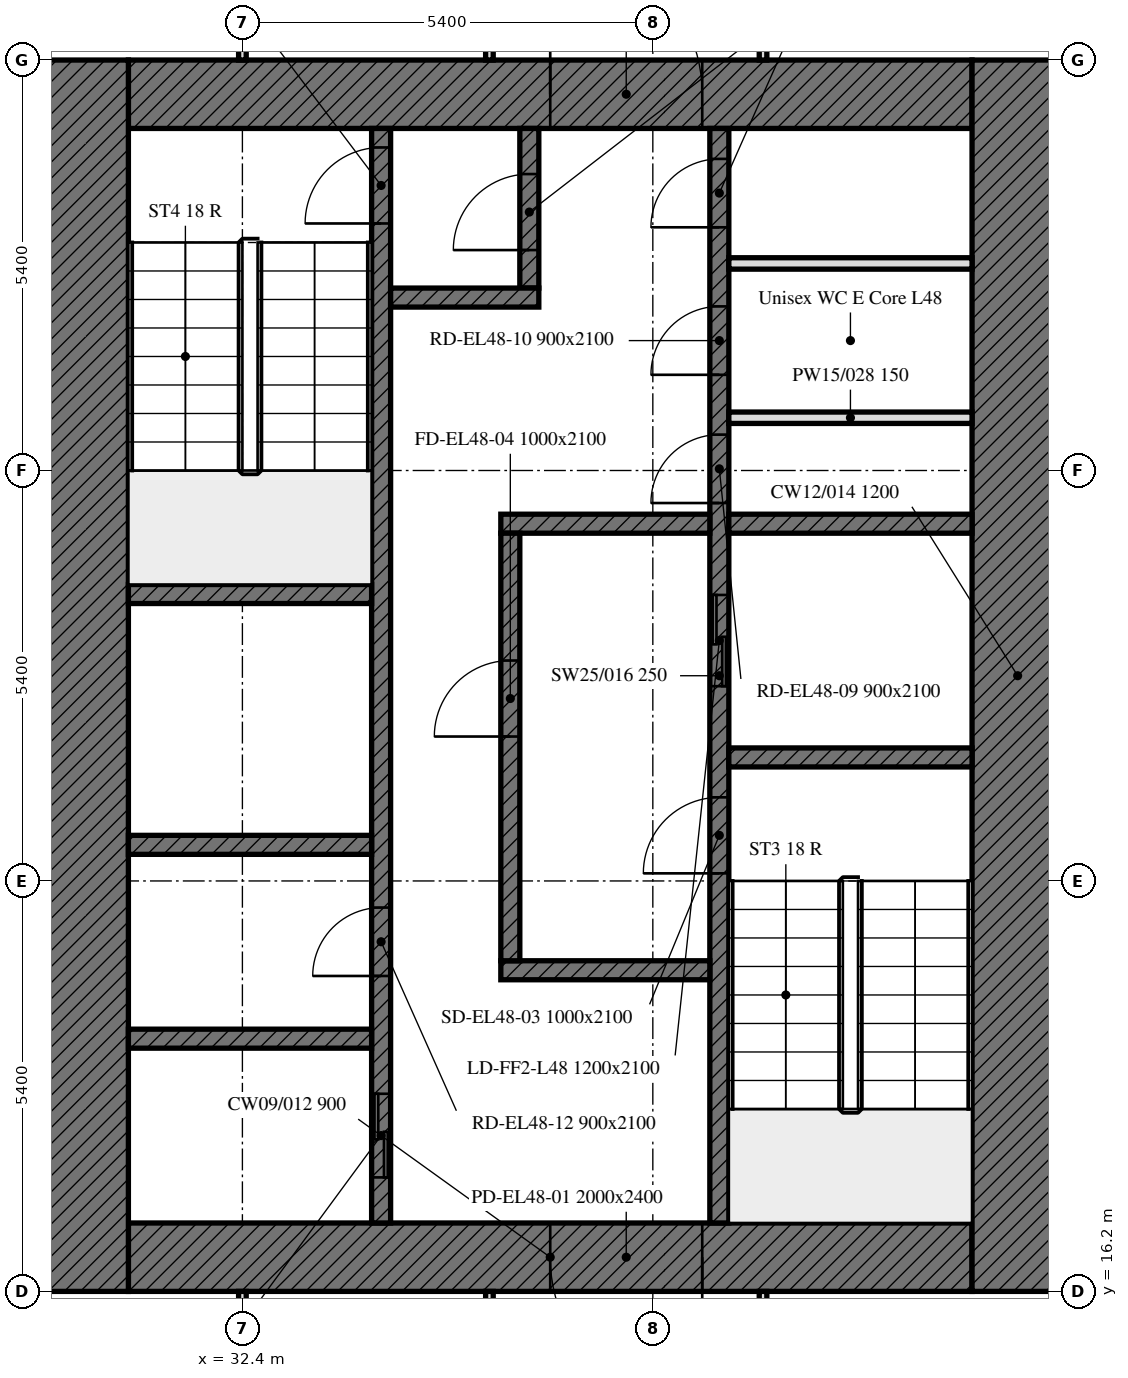
"""IFC4 building model, lengths in metres.
Left out: names, types, materials, properties, quantities, classifications, styles, units other than length and angle.
Written with IfcOpenShell. Run it as: python <this file> out.ifc"""

import sys

from ifc_helpers import new_model, si_unit, direction, frame, frame_2d, origin, place, context, subcontext, project, spatial, rectangle, extrude, element, fill, save


model = new_model("IFC4")
c1 = context("Model", 3, precision=1e-05, world=origin(), true_north=direction((0.0, 1.0)))
c2 = subcontext(c1, "Body", "Model", "MODEL_VIEW")
j1 = project(units=[si_unit("LENGTHUNIT", "METRE"), si_unit("PLANEANGLEUNIT", "RADIAN")], contexts=[c1])
p1 = place(None, origin())
s1 = spatial("IfcSite", under=j1, at=p1, CompositionType="ELEMENT")
p2 = place(p1, origin())
s2 = spatial("IfcBuilding", under=s1, at=p2, CompositionType="ELEMENT")
p3 = place(p2, frame((0.0, 0.0, 197.2)))
s3 = spatial("IfcBuildingStorey", under=s2, at=p3, CompositionType="ELEMENT", Elevation=197.2)
p4 = place(p3, frame((42.0, 16.65, 0.0), z_axis=(0.0, 0.0, 1.0), x_axis=(-1.0, 0.0, 0.0)))
e1 = element("IfcWall", 1, at=p4, inside=s3, PredefinedType="SOLIDWALL", context=c2, shape_type="SweptSolid", body=[
    extrude(rectangle(XDim=11.1, YDim=0.9, at=frame_2d((5.55, 0.0))), origin(), (0.0, 0.0, 1.0), 3.0),
])
p5 = place(p4, frame((3.55, 0.0, 0.0)))
e2 = element("IfcOpeningElement", 2, at=p5, cuts=e1, PredefinedType="OPENING", context=c2, shape_type="SweptSolid", body=[
    extrude(rectangle(XDim=2.0, YDim=2.4, at=frame_2d((1.0, 1.2))), frame((0.0, 0.45, 0.0), z_axis=(0.0, -1.0, 0.0), x_axis=(1.0, 0.0, 0.0)), (0.0, 0.0, 1.0), 0.9),
])
p6 = place(p3, frame((30.9, 31.95, 0.0), z_axis=(0.0, 0.0, 1.0), x_axis=(1.0, 0.0, 0.0)))
e3 = element("IfcWall", 3, at=p6, inside=s3, PredefinedType="SOLIDWALL", context=c2, shape_type="SweptSolid", body=[
    extrude(rectangle(XDim=11.1, YDim=0.9, at=frame_2d((5.55, 0.0))), origin(), (0.0, 0.0, 1.0), 3.0),
])
p7 = place(p6, frame((5.55, 0.0, 0.0)))
e4 = element("IfcOpeningElement", 4, at=p7, cuts=e3, PredefinedType="OPENING", context=c2, shape_type="SweptSolid", body=[
    extrude(rectangle(XDim=2.0, YDim=2.4, at=frame_2d((1.0, 1.2))), frame((0.0, 0.45, 0.0), z_axis=(0.0, -1.0, 0.0), x_axis=(1.0, 0.0, 0.0)), (0.0, 0.0, 1.0), 0.9),
])
for number, where, z_axis, x_axis in (
    (5, (42.6, 32.4, 0.0), (0.0, 0.0, 1.0), (0.0, -1.0, 0.0)),
    (6, (30.3, 16.2, 0.0), (0.0, 0.0, 1.0), (0.0, 1.0, 0.0)),
):
    element("IfcWall", number, at=place(p3, frame(where, z_axis=z_axis, x_axis=x_axis)), inside=s3, PredefinedType="SOLIDWALL", context=c2, shape_type="SweptSolid", body=[
        extrude(rectangle(XDim=16.2, YDim=1.2, at=frame_2d((8.1, 0.0))), origin(), (0.0, 0.0, 1.0), 3.0),
    ])
p8 = place(p3, frame((38.675, 17.1, 0.0), z_axis=(0.0, 0.0, 1.0), x_axis=(0.0, 1.0, 0.0)))
e7 = element("IfcWall", 7, at=p8, inside=s3, PredefinedType="SOLIDWALL", context=c2, shape_type="SweptSolid", body=[
    extrude(rectangle(XDim=14.4, YDim=0.25, at=frame_2d((7.2, 0.0))), origin(), (0.0, 0.0, 1.0), 3.0),
])
p9 = place(p8, frame((4.6, 0.0, 0.0)))
e8 = element("IfcOpeningElement", 8, at=p9, cuts=e7, PredefinedType="OPENING", context=c2, shape_type="SweptSolid", body=[
    extrude(rectangle(XDim=1.0, YDim=2.1, at=frame_2d((0.5, 1.05))), frame((0.0, 0.125, 0.0), z_axis=(0.0, -1.0, 0.0), x_axis=(1.0, 0.0, 0.0)), (0.0, 0.0, 1.0), 0.25),
])
p10 = place(p8, frame((7.062, 0.0, 0.0)))
e9 = element("IfcOpeningElement", 9, at=p10, cuts=e7, PredefinedType="OPENING", context=c2, shape_type="SweptSolid", body=[
    extrude(rectangle(XDim=1.2, YDim=2.1, at=frame_2d((0.6, 1.05))), frame((0.0, 0.125, 0.0), z_axis=(0.0, -1.0, 0.0), x_axis=(1.0, 0.0, 0.0)), (0.0, 0.0, 1.0), 0.25),
])
p11 = place(p8, frame((9.472, 0.0, 0.0)))
e10 = element("IfcOpeningElement", 10, at=p11, cuts=e7, PredefinedType="OPENING", context=c2, shape_type="SweptSolid", body=[
    extrude(rectangle(XDim=0.9, YDim=2.1, at=frame_2d((0.45, 1.05))), frame((0.0, 0.125, 0.0), z_axis=(0.0, -1.0, 0.0), x_axis=(1.0, 0.0, 0.0)), (0.0, 0.0, 1.0), 0.25),
])
p12 = place(p8, frame((11.159, 0.0, 0.0)))
e11 = element("IfcOpeningElement", 11, at=p12, cuts=e7, PredefinedType="OPENING", context=c2, shape_type="SweptSolid", body=[
    extrude(rectangle(XDim=0.9, YDim=2.1, at=frame_2d((0.45, 1.05))), frame((0.0, 0.125, 0.0), z_axis=(0.0, -1.0, 0.0), x_axis=(1.0, 0.0, 0.0)), (0.0, 0.0, 1.0), 0.25),
])
p13 = place(p8, frame((13.1, 0.0, 0.0)))
e12 = element("IfcOpeningElement", 12, at=p13, cuts=e7, PredefinedType="OPENING", context=c2, shape_type="SweptSolid", body=[
    extrude(rectangle(XDim=0.9, YDim=2.1, at=frame_2d((0.45, 1.05))), frame((0.0, 0.125, 0.0), z_axis=(0.0, -1.0, 0.0), x_axis=(1.0, 0.0, 0.0)), (0.0, 0.0, 1.0), 0.25),
])
p14 = place(p3, frame((34.225, 17.1, 0.0), z_axis=(0.0, 0.0, 1.0), x_axis=(0.0, 1.0, 0.0)))
e13 = element("IfcWall", 13, at=p14, inside=s3, PredefinedType="SOLIDWALL", context=c2, shape_type="SweptSolid", body=[
    extrude(rectangle(XDim=14.4, YDim=0.25, at=frame_2d((7.2, 0.0))), origin(), (0.0, 0.0, 1.0), 3.0),
])
p15 = place(p14, frame((13.15, 0.0, 0.0)))
e14 = element("IfcOpeningElement", 14, at=p15, cuts=e13, PredefinedType="OPENING", context=c2, shape_type="SweptSolid", body=[
    extrude(rectangle(XDim=1.0, YDim=2.1, at=frame_2d((0.5, 1.05))), frame((0.0, 0.125, 0.0), z_axis=(0.0, -1.0, 0.0), x_axis=(1.0, 0.0, 0.0)), (0.0, 0.0, 1.0), 0.25),
])
p16 = place(p14, frame((0.6, 0.0, 0.0)))
e15 = element("IfcOpeningElement", 15, at=p16, cuts=e13, PredefinedType="OPENING", context=c2, shape_type="SweptSolid", body=[
    extrude(rectangle(XDim=1.1, YDim=2.1, at=frame_2d((0.55, 1.05))), frame((0.0, 0.125, 0.0), z_axis=(0.0, -1.0, 0.0), x_axis=(1.0, 0.0, 0.0)), (0.0, 0.0, 1.0), 0.25),
])
p17 = place(p14, frame((3.25, 0.0, 0.0)))
e16 = element("IfcOpeningElement", 16, at=p17, cuts=e13, PredefinedType="OPENING", context=c2, shape_type="SweptSolid", body=[
    extrude(rectangle(XDim=0.9, YDim=2.1, at=frame_2d((0.45, 1.05))), frame((0.0, 0.125, 0.0), z_axis=(0.0, -1.0, 0.0), x_axis=(1.0, 0.0, 0.0)), (0.0, 0.0, 1.0), 0.25),
])
p18 = place(p3, frame((38.8, 23.225, 0.0), z_axis=(0.0, 0.0, 1.0), x_axis=(1.0, 0.0, 0.0)))
e17 = element("IfcWall", 17, at=p18, inside=s3, PredefinedType="SOLIDWALL", context=c2, shape_type="SweptSolid", body=[
    extrude(rectangle(XDim=3.2, YDim=0.25, at=frame_2d((1.6, 0.0))), origin(), (0.0, 0.0, 1.0), 3.0),
])
for number, where, z_axis, x_axis in (
    (18, (30.9, 25.375, 0.0), (0.0, 0.0, 1.0), (1.0, 0.0, 0.0)),
    (19, (30.9, 22.075, 0.0), (0.0, 0.0, 1.0), (1.0, 0.0, 0.0)),
):
    element("IfcWall", number, at=place(p3, frame(where, z_axis=z_axis, x_axis=x_axis)), inside=s3, PredefinedType="SOLIDWALL", context=c2, shape_type="SweptSolid", body=[
        extrude(rectangle(XDim=3.2, YDim=0.25, at=frame_2d((1.6, 0.0))), origin(), (0.0, 0.0, 1.0), 3.0),
    ])
p19 = place(p3, frame((38.8, 26.3, 0.0), z_axis=(0.0, 0.0, 1.0), x_axis=(1.0, 0.0, 0.0)))
e20 = element("IfcWall", 20, at=p19, inside=s3, PredefinedType="SOLIDWALL", context=c2, shape_type="SweptSolid", body=[
    extrude(rectangle(XDim=3.2, YDim=0.25, at=frame_2d((1.6, 0.0))), origin(), (0.0, 0.0, 1.0), 3.0),
])
for number, where, z_axis, x_axis in (
    (21, (35.8, 26.3, 0.0), (0.0, 0.0, 1.0), (1.0, 0.0, 0.0)),
    (22, (35.8, 20.425, 0.0), (0.0, 0.0, 1.0), (1.0, 0.0, 0.0)),
):
    element("IfcWall", number, at=place(p3, frame(where, z_axis=z_axis, x_axis=x_axis)), inside=s3, PredefinedType="SOLIDWALL", context=c2, shape_type="SweptSolid", body=[
        extrude(rectangle(XDim=2.75, YDim=0.25, at=frame_2d((1.375, 0.0))), origin(), (0.0, 0.0, 1.0), 3.0),
    ])
p20 = place(p3, frame((36.175, 29.4, 0.0), z_axis=(0.0, 0.0, 1.0), x_axis=(0.0, 1.0, 0.0)))
e23 = element("IfcWall", 23, at=p20, inside=s3, PredefinedType="SOLIDWALL", context=c2, shape_type="SweptSolid", body=[
    extrude(rectangle(XDim=2.1, YDim=0.25, at=frame_2d((1.05, 0.0))), origin(), (0.0, 0.0, 1.0), 3.0),
])
p21 = place(p20, frame((0.5, 0.0, 0.0)))
e24 = element("IfcOpeningElement", 24, at=p21, cuts=e23, PredefinedType="OPENING", context=c2, shape_type="SweptSolid", body=[
    extrude(rectangle(XDim=1.0, YDim=2.1, at=frame_2d((0.5, 1.05))), frame((0.0, 0.125, 0.0), z_axis=(0.0, -1.0, 0.0), x_axis=(1.0, 0.0, 0.0)), (0.0, 0.0, 1.0), 0.25),
])
p22 = place(p3, frame((34.35, 29.275, 0.0), z_axis=(0.0, 0.0, 1.0), x_axis=(1.0, 0.0, 0.0)))
e25 = element("IfcWall", 25, at=p22, inside=s3, PredefinedType="SOLIDWALL", context=c2, shape_type="SweptSolid", body=[
    extrude(rectangle(XDim=1.95, YDim=0.25, at=frame_2d((0.975, 0.0))), origin(), (0.0, 0.0, 1.0), 3.0),
])
p23 = place(p3, frame((35.925, 20.55, 0.0), z_axis=(0.0, 0.0, 1.0), x_axis=(0.0, 1.0, 0.0)))
e26 = element("IfcWall", 26, at=p23, inside=s3, PredefinedType="SOLIDWALL", context=c2, shape_type="SweptSolid", body=[
    extrude(rectangle(XDim=5.625, YDim=0.25, at=frame_2d((2.812, 0.0))), origin(), (0.0, 0.0, 1.0), 3.0),
])
p24 = place(p23, frame((2.95, 0.0, 0.0)))
e27 = element("IfcOpeningElement", 27, at=p24, cuts=e26, PredefinedType="OPENING", context=c2, shape_type="SweptSolid", body=[
    extrude(rectangle(XDim=1.0, YDim=2.1, at=frame_2d((0.5, 1.05))), frame((0.0, 0.125, 0.0), z_axis=(0.0, -1.0, 0.0), x_axis=(1.0, 0.0, 0.0)), (0.0, 0.0, 1.0), 0.25),
])
p25 = place(p3, frame((30.9, 19.525, 0.0), z_axis=(0.0, 0.0, 1.0), x_axis=(1.0, 0.0, 0.0)))
e28 = element("IfcWall", 28, at=p25, inside=s3, PredefinedType="SOLIDWALL", context=c2, shape_type="SweptSolid", body=[
    extrude(rectangle(XDim=3.2, YDim=0.25, at=frame_2d((1.6, 0.0))), origin(), (0.0, 0.0, 1.0), 3.0),
])
for number, where, z_axis, x_axis in (
    (29, (38.8, 27.694, 0.0), (0.0, 0.0, 1.0), (1.0, 0.0, 0.0)),
    (30, (38.8, 29.724, 0.0), (0.0, 0.0, 1.0), (1.0, 0.0, 0.0)),
):
    element("IfcWall", number, at=place(p3, frame(where, z_axis=z_axis, x_axis=x_axis)), inside=s3, PredefinedType="PARTITIONING", context=c2, shape_type="SweptSolid", body=[
        extrude(rectangle(XDim=3.2, YDim=0.15, at=frame_2d((1.6, 0.0))), origin(), (0.0, 0.0, 1.0), 3.0),
    ])
p26 = place(p3, frame((32.4, 32.4, 0.0), z_axis=(0.0, 0.0, 1.0), x_axis=(0.0, 1.0, 0.0)))
e31 = element("IfcWall", 31, at=p26, inside=s3, PredefinedType="PARTITIONING", context=c2, shape_type="SweptSolid", body=[
    extrude(rectangle(XDim=4.98, YDim=0.1, at=frame_2d((2.49, 0.0))), origin(), (0.0, 0.0, 1.0), 2.4),
])
for number, where, z_axis, x_axis in (
    (32, (35.65, 39.525, 0.0), (0.0, 0.0, 1.0), (0.0, -1.0, 0.0)),
    (33, (39.25, 32.4, 0.0), (0.0, 0.0, 1.0), (0.0, 1.0, 0.0)),
):
    element("IfcWall", number, at=place(p3, frame(where, z_axis=z_axis, x_axis=x_axis)), inside=s3, PredefinedType="PARTITIONING", context=c2, shape_type="SweptSolid", body=[
        extrude(rectangle(XDim=7.125, YDim=0.1, at=frame_2d((3.562, 0.0))), origin(), (0.0, 0.0, 1.0), 2.4),
    ])
for number, where, z_axis, x_axis in (
    (34, (32.4, 13.575, 0.0), (0.0, 0.0, 1.0), (0.0, 1.0, 0.0)),
    (35, (35.65, 16.2, 0.0), (0.0, 0.0, 1.0), (0.0, -1.0, 0.0)),
    (36, (39.25, 13.575, 0.0), (0.0, 0.0, 1.0), (0.0, 1.0, 0.0)),
):
    element("IfcWall", number, at=place(p3, frame(where, z_axis=z_axis, x_axis=x_axis)), inside=s3, PredefinedType="PARTITIONING", context=c2, shape_type="SweptSolid", body=[
        extrude(rectangle(XDim=2.625, YDim=0.1, at=frame_2d((1.312, 0.0))), origin(), (0.0, 0.0, 1.0), 3.0),
    ])
p27 = place(p5, origin())
e37 = element("IfcDoor", 37, at=p27, inside=s3, OperationType="DOUBLE_DOOR_SINGLE_SWING", PredefinedType="DOOR", context=c2, shape_type="SweptSolid", body=[
    extrude(rectangle(XDim=2.0, YDim=2.4, at=frame_2d((1.0, 1.2))), frame((0.0, 0.025, 0.0), z_axis=(0.0, -1.0, 0.0), x_axis=(1.0, 0.0, 0.0)), (0.0, 0.0, 1.0), 0.05),
])
fill(e2, e37)
p28 = place(p7, origin())
e38 = element("IfcDoor", 38, at=p28, inside=s3, OperationType="DOUBLE_DOOR_SINGLE_SWING", PredefinedType="DOOR", context=c2, shape_type="SweptSolid", body=[
    extrude(rectangle(XDim=2.0, YDim=2.4, at=frame_2d((1.0, 1.2))), frame((0.0, 0.025, 0.0), z_axis=(0.0, -1.0, 0.0), x_axis=(1.0, 0.0, 0.0)), (0.0, 0.0, 1.0), 0.05),
])
fill(e4, e38)
p29 = place(p9, origin())
e39 = element("IfcDoor", 39, at=p29, inside=s3, OperationType="SINGLE_SWING_LEFT", PredefinedType="DOOR", context=c2, shape_type="SweptSolid", body=[
    extrude(rectangle(XDim=1.0, YDim=2.1, at=frame_2d((0.5, 1.05))), frame((0.0, 0.025, 0.0), z_axis=(0.0, -1.0, 0.0), x_axis=(1.0, 0.0, 0.0)), (0.0, 0.0, 1.0), 0.05),
])
fill(e8, e39)
p30 = place(p24, origin())
e40 = element("IfcDoor", 40, at=p30, inside=s3, OperationType="SINGLE_SWING_LEFT", PredefinedType="DOOR", context=c2, shape_type="SweptSolid", body=[
    extrude(rectangle(XDim=1.0, YDim=2.1, at=frame_2d((0.5, 1.05))), frame((0.0, 0.025, 0.0), z_axis=(0.0, -1.0, 0.0), x_axis=(1.0, 0.0, 0.0)), (0.0, 0.0, 1.0), 0.05),
])
fill(e27, e40)
p31 = place(p15, origin())
e41 = element("IfcDoor", 41, at=p31, inside=s3, OperationType="SINGLE_SWING_LEFT", PredefinedType="DOOR", context=c2, shape_type="SweptSolid", body=[
    extrude(rectangle(XDim=1.0, YDim=2.1, at=frame_2d((0.5, 1.05))), frame((0.0, 0.025, 0.0), z_axis=(0.0, -1.0, 0.0), x_axis=(1.0, 0.0, 0.0)), (0.0, 0.0, 1.0), 0.05),
])
fill(e14, e41)
p32 = place(p21, origin())
e42 = element("IfcDoor", 42, at=p32, inside=s3, OperationType="SINGLE_SWING_LEFT", PredefinedType="DOOR", context=c2, shape_type="SweptSolid", body=[
    extrude(rectangle(XDim=1.0, YDim=2.1, at=frame_2d((0.5, 1.05))), frame((0.0, 0.025, 0.0), z_axis=(0.0, -1.0, 0.0), x_axis=(1.0, 0.0, 0.0)), (0.0, 0.0, 1.0), 0.05),
])
fill(e24, e42)
p33 = place(p10, origin())
e43 = element("IfcDoor", 43, at=p33, inside=s3, OperationType="DOUBLE_DOOR_SLIDING", PredefinedType="DOOR", context=c2, shape_type="SweptSolid", body=[
    extrude(rectangle(XDim=1.2, YDim=2.1, at=frame_2d((0.6, 1.05))), frame((0.0, 0.025, 0.0), z_axis=(0.0, -1.0, 0.0), x_axis=(1.0, 0.0, 0.0)), (0.0, 0.0, 1.0), 0.05),
])
fill(e9, e43)
p34 = place(p16, origin())
e44 = element("IfcDoor", 44, at=p34, inside=s3, OperationType="DOUBLE_DOOR_SLIDING", PredefinedType="DOOR", context=c2, shape_type="SweptSolid", body=[
    extrude(rectangle(XDim=1.1, YDim=2.1, at=frame_2d((0.55, 1.05))), frame((0.0, 0.025, 0.0), z_axis=(0.0, -1.0, 0.0), x_axis=(1.0, 0.0, 0.0)), (0.0, 0.0, 1.0), 0.05),
])
fill(e15, e44)
p35 = place(p11, origin())
e45 = element("IfcDoor", 45, at=p35, inside=s3, OperationType="SINGLE_SWING_LEFT", PredefinedType="DOOR", context=c2, shape_type="SweptSolid", body=[
    extrude(rectangle(XDim=0.9, YDim=2.1, at=frame_2d((0.45, 1.05))), frame((0.0, 0.025, 0.0), z_axis=(0.0, -1.0, 0.0), x_axis=(1.0, 0.0, 0.0)), (0.0, 0.0, 1.0), 0.05),
])
fill(e10, e45)
p36 = place(p12, origin())
e46 = element("IfcDoor", 46, at=p36, inside=s3, OperationType="SINGLE_SWING_LEFT", PredefinedType="DOOR", context=c2, shape_type="SweptSolid", body=[
    extrude(rectangle(XDim=0.9, YDim=2.1, at=frame_2d((0.45, 1.05))), frame((0.0, 0.025, 0.0), z_axis=(0.0, -1.0, 0.0), x_axis=(1.0, 0.0, 0.0)), (0.0, 0.0, 1.0), 0.05),
])
fill(e11, e46)
p37 = place(p13, origin())
e47 = element("IfcDoor", 47, at=p37, inside=s3, OperationType="SINGLE_SWING_LEFT", PredefinedType="DOOR", context=c2, shape_type="SweptSolid", body=[
    extrude(rectangle(XDim=0.9, YDim=2.1, at=frame_2d((0.45, 1.05))), frame((0.0, 0.025, 0.0), z_axis=(0.0, -1.0, 0.0), x_axis=(1.0, 0.0, 0.0)), (0.0, 0.0, 1.0), 0.05),
])
fill(e12, e47)
p38 = place(p17, origin())
e48 = element("IfcDoor", 48, at=p38, inside=s3, OperationType="SINGLE_SWING_LEFT", PredefinedType="DOOR", context=c2, shape_type="SweptSolid", body=[
    extrude(rectangle(XDim=0.9, YDim=2.1, at=frame_2d((0.45, 1.05))), frame((0.0, 0.025, 0.0), z_axis=(0.0, -1.0, 0.0), x_axis=(1.0, 0.0, 0.0)), (0.0, 0.0, 1.0), 0.05),
])
fill(e16, e48)
save(model, sys.argv[1])
